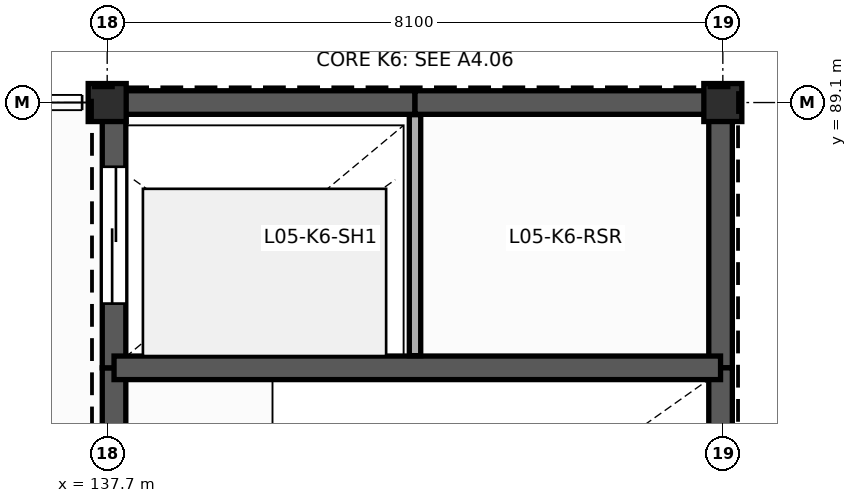
"""IFC4 building model, lengths in metres.
Left out: names, types, materials, properties, quantities, classifications, styles, units other than length and angle.
Written with IfcOpenShell. Run it as: python <this file> out.ifc"""

import sys

from ifc_helpers import new_model, si_unit, direction, frame, frame_2d, origin, origin_2d, place, context, subcontext, project, spatial, rectangle, extrude, element, fill, save


model = new_model("IFC4")
c1 = context("Model", 3, precision=1e-05, world=origin(), true_north=direction((0.0, 1.0)))
c2 = subcontext(c1, "Body", "Model", "MODEL_VIEW")
j1 = project(units=[si_unit("LENGTHUNIT", "METRE"), si_unit("PLANEANGLEUNIT", "RADIAN")], contexts=[c1])
p1 = place(None, origin())
s1 = spatial("IfcSite", under=j1, at=p1, CompositionType="ELEMENT")
p2 = place(p1, origin())
s2 = spatial("IfcBuilding", under=s1, at=p2, CompositionType="ELEMENT")
p3 = place(p2, frame((0.0, 0.0, 23.4)))
s3 = spatial("IfcBuildingStorey", under=s2, at=p3, CompositionType="ELEMENT", Elevation=23.4)
for number, where, z_axis, x_axis in (
    (1, (137.7, 89.1, 0.0), (0.0, 0.0, 1.0), (1.0, 0.0, 0.0)),
    (2, (145.8, 89.1, 0.0), (0.0, 0.0, 1.0), (1.0, 0.0, 0.0)),
):
    element("IfcColumn", number, at=place(p3, frame(where, z_axis=z_axis, x_axis=x_axis)), inside=s3, PredefinedType="COLUMN", context=c2, shape_type="SweptSolid", body=[
        extrude(rectangle(XDim=0.5, YDim=0.5, at=origin_2d()), origin(), (0.0, 0.0, 1.0), 4.2),
    ])
p4 = place(p3, frame((137.79, 81.25, 0.0), z_axis=(0.0, 0.0, 1.0), x_axis=(0.0, 1.0, 0.0)))
e3 = element("IfcWall", 3, at=p4, inside=s3, PredefinedType="SHEAR", context=c2, shape_type="SweptSolid", body=[
    extrude(rectangle(XDim=4.36, YDim=0.31, at=frame_2d((2.18, 0.0))), origin(), (0.0, 0.0, 1.0), 4.2),
])
p5 = place(p4, frame((1.35, 0.0, 0.0)))
e4 = element("IfcOpeningElement", 4, at=p5, cuts=e3, PredefinedType="OPENING", context=c2, shape_type="SweptSolid", body=[
    extrude(rectangle(XDim=1.2, YDim=2.25, at=frame_2d((0.6, 1.125))), frame((0.0, 0.165, 0.0), z_axis=(0.0, -1.0, 0.0), x_axis=(1.0, 0.0, 0.0)), (0.0, 0.0, 1.0), 0.33),
])
p6 = place(p3, frame((137.79, 85.61, 0.0), z_axis=(0.0, 0.0, 1.0), x_axis=(0.0, 1.0, 0.0)))
e5 = element("IfcWall", 5, at=p6, inside=s3, PredefinedType="SHEAR", context=c2, shape_type="SweptSolid", body=[
    extrude(rectangle(XDim=3.49, YDim=0.31, at=frame_2d((1.745, 0.0))), origin(), (0.0, 0.0, 1.0), 4.2),
])
p7 = place(p6, frame((0.845, 0.0, 0.0)))
e6 = element("IfcOpeningElement", 6, at=p7, cuts=e5, PredefinedType="OPENING", context=c2, shape_type="SweptSolid", body=[
    extrude(rectangle(XDim=1.8, YDim=2.4, at=frame_2d((0.9, 1.2))), frame((0.0, 0.165, 0.0), z_axis=(0.0, -1.0, 0.0), x_axis=(1.0, 0.0, 0.0)), (0.0, 0.0, 1.0), 0.33),
])
p8 = place(p3, frame((137.79, 89.1, 0.0), z_axis=(0.0, 0.0, 1.0), x_axis=(1.0, 0.0, 0.0)))
e7 = element("IfcWall", 7, at=p8, inside=s3, PredefinedType="SHEAR", context=c2, shape_type="SweptSolid", body=[
    extrude(rectangle(XDim=3.96, YDim=0.31, at=frame_2d((1.98, 0.0))), origin(), (0.0, 0.0, 1.0), 4.2),
])
p9 = place(p3, frame((141.75, 89.1, 0.0), z_axis=(0.0, 0.0, 1.0), x_axis=(1.0, 0.0, 0.0)))
e8 = element("IfcWall", 8, at=p9, inside=s3, PredefinedType="SHEAR", context=c2, shape_type="SweptSolid", body=[
    extrude(rectangle(XDim=4.02, YDim=0.31, at=frame_2d((2.01, 0.0))), origin(), (0.0, 0.0, 1.0), 4.2),
])
p10 = place(p3, frame((145.77, 89.1, 0.0), z_axis=(0.0, 0.0, 1.0), x_axis=(0.0, -1.0, 0.0)))
e9 = element("IfcWall", 9, at=p10, inside=s3, PredefinedType="SHEAR", context=c2, shape_type="SweptSolid", body=[
    extrude(rectangle(XDim=3.49, YDim=0.31, at=frame_2d((1.745, 0.0))), origin(), (0.0, 0.0, 1.0), 4.2),
])
p11 = place(p3, frame((145.77, 85.61, 0.0), z_axis=(0.0, 0.0, 1.0), x_axis=(0.0, -1.0, 0.0)))
e10 = element("IfcWall", 10, at=p11, inside=s3, PredefinedType="SHEAR", context=c2, shape_type="SweptSolid", body=[
    extrude(rectangle(XDim=4.36, YDim=0.31, at=frame_2d((2.18, 0.0))), origin(), (0.0, 0.0, 1.0), 4.2),
])
p12 = place(p3, frame((137.79, 85.61, 0.0), z_axis=(0.0, 0.0, 1.0), x_axis=(1.0, 0.0, 0.0)))
e11 = element("IfcWall", 11, at=p12, inside=s3, PredefinedType="SHEAR", context=c2, shape_type="SweptSolid", body=[
    extrude(rectangle(XDim=7.98, YDim=0.31, at=frame_2d((3.99, 0.0))), origin(), (0.0, 0.0, 1.0), 4.2),
])
p13 = place(p3, frame((141.75, 85.77, 0.0), z_axis=(0.0, 0.0, 1.0), x_axis=(0.0, 1.0, 0.0)))
e12 = element("IfcWall", 12, at=p13, inside=s3, PredefinedType="PLUMBINGWALL", context=c2, shape_type="SweptSolid", body=[
    extrude(rectangle(XDim=3.17, YDim=0.15, at=frame_2d((1.585, 0.0))), origin(), (0.0, 0.0, 1.0), 3.85),
])
p14 = place(p7, origin())
e13 = element("IfcDoor", 13, at=p14, inside=s3, OperationType="SLIDING_TO_LEFT", PredefinedType="DOOR", context=c2, shape_type="SweptSolid", body=[
    extrude(rectangle(XDim=1.8, YDim=2.4, at=frame_2d((0.9, 1.2))), frame((0.0, 0.025, 0.0), z_axis=(0.0, -1.0, 0.0), x_axis=(1.0, 0.0, 0.0)), (0.0, 0.0, 1.0), 0.05),
])
fill(e6, e13)
save(model, sys.argv[1])
